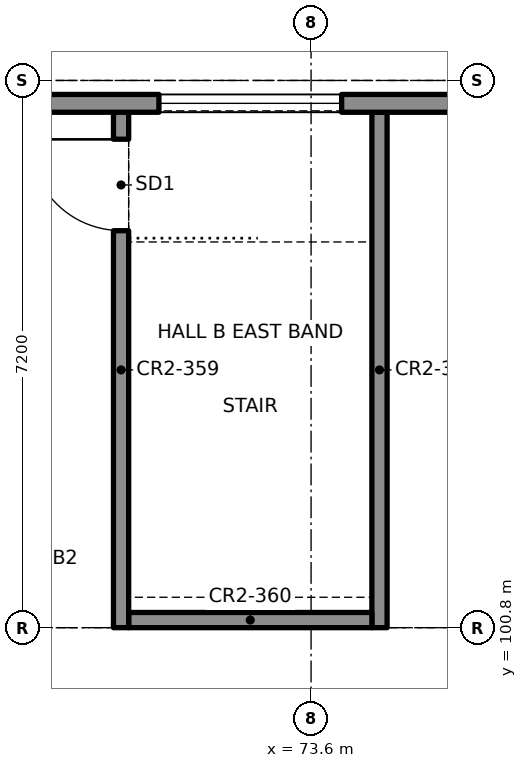
"""IFC4 building model, lengths in metres.
Left out: names, types, materials, properties, quantities, classifications, styles, units other than length and angle.
Written with IfcOpenShell. Run it as: python <this file> out.ifc"""

import sys

from ifc_helpers import new_model, si_unit, direction, frame, frame_2d, origin, place, context, subcontext, project, spatial, rectangle, extrude, element, fill, save


model = new_model("IFC4")
c1 = context("Model", 3, precision=1e-05, world=origin(), true_north=direction((0.0, 1.0)))
c2 = subcontext(c1, "Body", "Model", "MODEL_VIEW")
j1 = project(units=[si_unit("LENGTHUNIT", "METRE"), si_unit("PLANEANGLEUNIT", "RADIAN")], contexts=[c1])
p1 = place(None, origin())
s1 = spatial("IfcSite", under=j1, at=p1, CompositionType="ELEMENT")
p2 = place(p1, origin())
s2 = spatial("IfcBuilding", under=s1, at=p2, CompositionType="ELEMENT")
p3 = place(p2, frame((0.0, 0.0, 4.4)))
s3 = spatial("IfcBuildingStorey", under=s2, at=p3, CompositionType="ELEMENT", Elevation=4.4)
p4 = place(p3, frame((26.8, 107.699, 0.0), z_axis=(0.0, 0.0, 1.0), x_axis=(1.0, 0.0, 0.0)))
e1 = element("IfcWall", 1, at=p4, inside=s3, PredefinedType="SOLIDWALL", context=c2, shape_type="SweptSolid", body=[
    extrude(rectangle(XDim=50.4, YDim=0.234, at=frame_2d((25.2, 0.0))), origin(), (0.0, 0.0, 1.0), 4.4),
])
p5 = place(p4, frame((2.8, 0.0, 1.0)))
e2 = element("IfcOpeningElement", 2, at=p5, cuts=e1, PredefinedType="OPENING", context=c2, shape_type="SweptSolid", body=[
    extrude(rectangle(XDim=2.4, YDim=2.4, at=frame_2d((1.2, 1.2))), frame((0.0, 0.127, 0.0), z_axis=(0.0, -1.0, 0.0), x_axis=(1.0, 0.0, 0.0)), (0.0, 0.0, 1.0), 0.254),
])
p6 = place(p4, frame((9.6, 0.0, 1.0)))
e3 = element("IfcOpeningElement", 3, at=p6, cuts=e1, PredefinedType="OPENING", context=c2, shape_type="SweptSolid", body=[
    extrude(rectangle(XDim=2.4, YDim=2.4, at=frame_2d((1.2, 1.2))), frame((0.0, 0.127, 0.0), z_axis=(0.0, -1.0, 0.0), x_axis=(1.0, 0.0, 0.0)), (0.0, 0.0, 1.0), 0.254),
])
p7 = place(p4, frame((21.6, 0.0, 1.0)))
e4 = element("IfcOpeningElement", 4, at=p7, cuts=e1, PredefinedType="OPENING", context=c2, shape_type="SweptSolid", body=[
    extrude(rectangle(XDim=2.4, YDim=2.4, at=frame_2d((1.2, 1.2))), frame((0.0, 0.127, 0.0), z_axis=(0.0, -1.0, 0.0), x_axis=(1.0, 0.0, 0.0)), (0.0, 0.0, 1.0), 0.254),
])
p8 = place(p4, frame((26.4, 0.0, 1.0)))
e5 = element("IfcOpeningElement", 5, at=p8, cuts=e1, PredefinedType="OPENING", context=c2, shape_type="SweptSolid", body=[
    extrude(rectangle(XDim=2.4, YDim=2.4, at=frame_2d((1.2, 1.2))), frame((0.0, 0.127, 0.0), z_axis=(0.0, -1.0, 0.0), x_axis=(1.0, 0.0, 0.0)), (0.0, 0.0, 1.0), 0.254),
])
p9 = place(p4, frame((38.4, 0.0, 1.0)))
e6 = element("IfcOpeningElement", 6, at=p9, cuts=e1, PredefinedType="OPENING", context=c2, shape_type="SweptSolid", body=[
    extrude(rectangle(XDim=2.4, YDim=2.4, at=frame_2d((1.2, 1.2))), frame((0.0, 0.127, 0.0), z_axis=(0.0, -1.0, 0.0), x_axis=(1.0, 0.0, 0.0)), (0.0, 0.0, 1.0), 0.254),
])
p10 = place(p4, frame((44.8, 0.0, 1.0)))
e7 = element("IfcOpeningElement", 7, at=p10, cuts=e1, PredefinedType="OPENING", context=c2, shape_type="SweptSolid", body=[
    extrude(rectangle(XDim=2.4, YDim=2.4, at=frame_2d((1.2, 1.2))), frame((0.0, 0.127, 0.0), z_axis=(0.0, -1.0, 0.0), x_axis=(1.0, 0.0, 0.0)), (0.0, 0.0, 1.0), 0.254),
])
p11 = place(p3, frame((71.1, 100.8, 0.0), z_axis=(0.0, 0.0, 1.0), x_axis=(0.0, 1.0, 0.0)))
e8 = element("IfcWall", 8, at=p11, inside=s3, PredefinedType="SOLIDWALL", context=c2, shape_type="SweptSolid", body=[
    extrude(rectangle(XDim=6.783, YDim=0.2, at=frame_2d((3.392, 0.0))), origin(), (0.0, 0.0, 1.0), 3.0),
])
p12 = place(p11, frame((5.225, 0.0, 0.0)))
e9 = element("IfcOpeningElement", 9, at=p12, cuts=e8, PredefinedType="OPENING", context=c2, shape_type="SweptSolid", body=[
    extrude(rectangle(XDim=1.2, YDim=2.1, at=frame_2d((0.6, 1.05))), frame((0.0, 0.11, 0.0), z_axis=(0.0, -1.0, 0.0), x_axis=(1.0, 0.0, 0.0)), (0.0, 0.0, 1.0), 0.22),
])
p13 = place(p3, frame((74.5, 100.8, 0.0), z_axis=(0.0, 0.0, 1.0), x_axis=(0.0, 1.0, 0.0)))
e10 = element("IfcWall", 10, at=p13, inside=s3, PredefinedType="SOLIDWALL", context=c2, shape_type="SweptSolid", body=[
    extrude(rectangle(XDim=6.783, YDim=0.2, at=frame_2d((3.392, 0.0))), origin(), (0.0, 0.0, 1.0), 3.0),
])
p14 = place(p3, frame((71.2, 100.9, 0.0), z_axis=(0.0, 0.0, 1.0), x_axis=(1.0, 0.0, 0.0)))
e11 = element("IfcWall", 11, at=p14, inside=s3, PredefinedType="SOLIDWALL", context=c2, shape_type="SweptSolid", body=[
    extrude(rectangle(XDim=3.2, YDim=0.2, at=frame_2d((1.6, 0.0))), origin(), (0.0, 0.0, 1.0), 3.0),
])
p15 = place(p10, origin())
e12 = element("IfcWindow", 12, at=p15, inside=s3, PartitioningType="SINGLE_PANEL", PredefinedType="WINDOW", context=c2, shape_type="SweptSolid", body=[
    extrude(rectangle(XDim=2.4, YDim=2.4, at=frame_2d((1.2, 1.2))), frame((0.0, 0.03, 0.0), z_axis=(0.0, -1.0, 0.0), x_axis=(1.0, 0.0, 0.0)), (0.0, 0.0, 1.0), 0.06),
])
fill(e7, e12)
p16 = place(p12, origin())
e13 = element("IfcDoor", 13, at=p16, inside=s3, OperationType="SINGLE_SWING_RIGHT", PredefinedType="DOOR", context=c2, shape_type="SweptSolid", body=[
    extrude(rectangle(XDim=1.2, YDim=2.1, at=frame_2d((0.6, 1.05))), frame((0.0, 0.025, 0.0), z_axis=(0.0, -1.0, 0.0), x_axis=(1.0, 0.0, 0.0)), (0.0, 0.0, 1.0), 0.05),
])
fill(e9, e13)
save(model, sys.argv[1])
